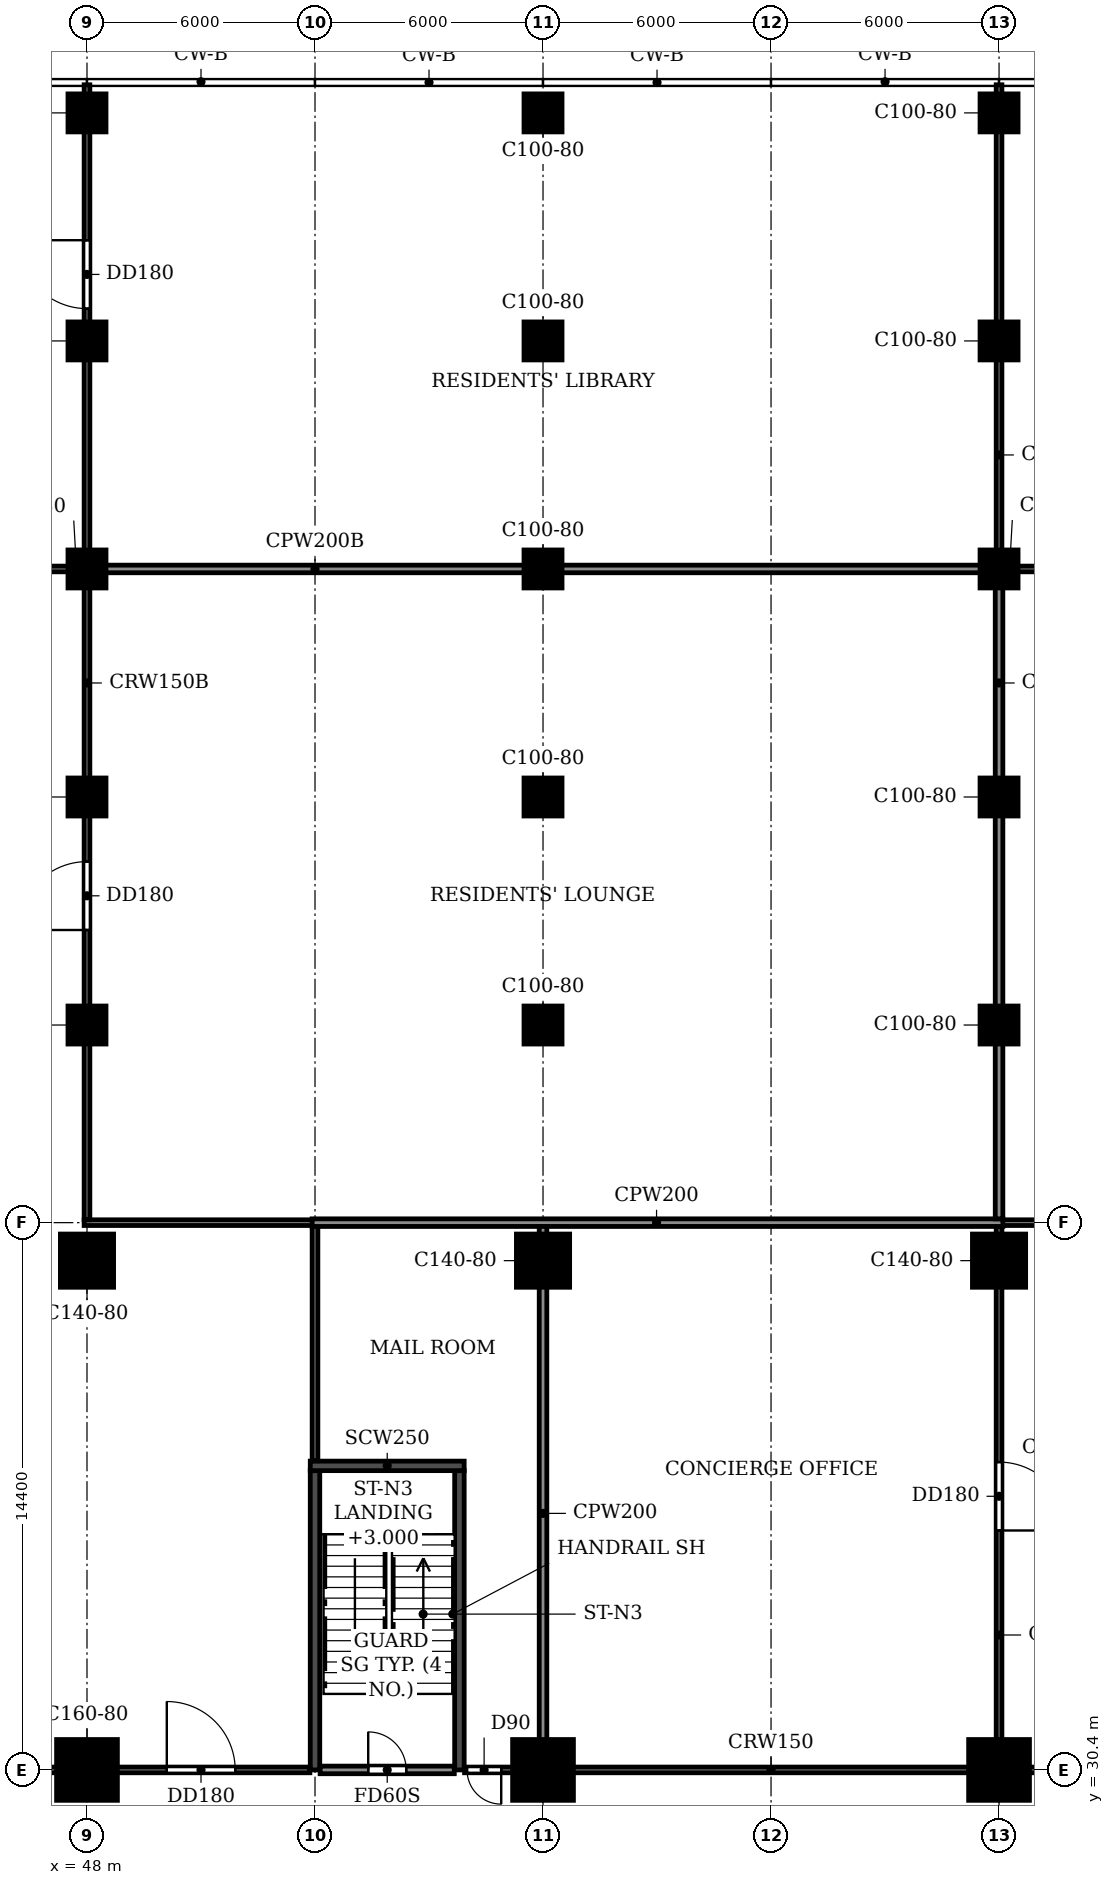
"""IFC4 building model, lengths in metres.
Left out: names, types, materials, properties, quantities, classifications, styles, units other than length and angle.
Written with IfcOpenShell. Run it as: python <this file> out.ifc"""

import sys

from ifc_helpers import new_model, si_unit, direction, frame, frame_2d, origin, origin_2d, place, context, subcontext, project, spatial, rectangle, extrude, source, transform, mapped, element, fill, save


model = new_model("IFC4")
c1 = context("Model", 3, precision=1e-05, world=origin(), true_north=direction((0.0, 1.0)))
c2 = subcontext(c1, "Body", "Model", "MODEL_VIEW")
j1 = project(units=[si_unit("LENGTHUNIT", "METRE"), si_unit("PLANEANGLEUNIT", "RADIAN")], contexts=[c1])
p1 = place(None, origin())
s1 = spatial("IfcSite", under=j1, at=p1, CompositionType="ELEMENT")
p2 = place(p1, origin())
s2 = spatial("IfcBuilding", under=s1, at=p2, CompositionType="ELEMENT")
p3 = place(p2, origin())
s3 = spatial("IfcBuildingStorey", under=s2, at=p3, CompositionType="ELEMENT", Elevation=0.0)
m1 = source(origin(), c2, "Body", "SweptSolid", [
    extrude(rectangle(XDim=1.6, YDim=1.6, at=origin_2d()), origin(), (0.0, 0.0, 1.0), 4.5),
])
p4 = place(p3, frame((48.0, 30.4, -0.3), z_axis=(0.0, 0.0, 1.0), x_axis=(1.0, 0.0, 0.0)))
e1 = element("IfcColumn", 1, at=p4, inside=s3, PredefinedType="COLUMN", context=c2, shape_type="MappedRepresentation", body=[
    mapped(m1, transform((0.0, 0.0, 0.0))),
])
m2 = source(origin(), c2, "Body", "SweptSolid", [
    extrude(rectangle(XDim=1.4, YDim=1.4, at=origin_2d()), origin(), (0.0, 0.0, 1.0), 4.5),
])
p5 = place(p3, frame((48.0, 43.8, -0.3), z_axis=(0.0, 0.0, 1.0), x_axis=(1.0, 0.0, 0.0)))
e2 = element("IfcColumn", 2, at=p5, inside=s3, PredefinedType="COLUMN", context=c2, shape_type="MappedRepresentation", body=[
    mapped(m2, transform((0.0, 0.0, 0.0))),
])
p6 = place(p3, frame((60.0, 30.4, -0.3), z_axis=(0.0, 0.0, 1.0), x_axis=(1.0, 0.0, 0.0)))
e3 = element("IfcColumn", 3, at=p6, inside=s3, PredefinedType="COLUMN", context=c2, shape_type="MappedRepresentation", body=[
    mapped(m1, transform((0.0, 0.0, 0.0))),
])
p7 = place(p3, frame((60.0, 43.8, -0.3), z_axis=(0.0, 0.0, 1.0), x_axis=(1.0, 0.0, 0.0)))
e4 = element("IfcColumn", 4, at=p7, inside=s3, PredefinedType="COLUMN", context=c2, shape_type="MappedRepresentation", body=[
    mapped(m2, transform((0.0, 0.0, 0.0))),
])
p8 = place(p3, frame((72.0, 30.4, -0.3), z_axis=(0.0, 0.0, 1.0), x_axis=(1.0, 0.0, 0.0)))
e5 = element("IfcColumn", 5, at=p8, inside=s3, PredefinedType="COLUMN", context=c2, shape_type="MappedRepresentation", body=[
    mapped(m1, transform((0.0, 0.0, 0.0))),
])
p9 = place(p3, frame((72.0, 43.8, -0.3), z_axis=(0.0, 0.0, 1.0), x_axis=(1.0, 0.0, 0.0)))
e6 = element("IfcColumn", 6, at=p9, inside=s3, PredefinedType="COLUMN", context=c2, shape_type="MappedRepresentation", body=[
    mapped(m2, transform((0.0, 0.0, 0.0))),
])
m3 = source(origin(), c2, "Body", "SweptSolid", [
    extrude(rectangle(XDim=1.0, YDim=1.0, at=origin_2d()), origin(), (0.0, 0.0, 1.0), 5.98),
])
for number, where, z_axis, x_axis in (
    (7, (48.0, 74.0, -0.3), (0.0, 0.0, 1.0), (1.0, 0.0, 0.0)),
    (8, (60.0, 74.0, -0.3), (0.0, 0.0, 1.0), (1.0, 0.0, 0.0)),
    (9, (72.0, 74.0, -0.3), (0.0, 0.0, 1.0), (1.0, 0.0, 0.0)),
    (10, (48.0, 68.0, -0.3), (0.0, 0.0, 1.0), (1.0, 0.0, 0.0)),
    (11, (60.0, 68.0, -0.3), (0.0, 0.0, 1.0), (1.0, 0.0, 0.0)),
    (12, (72.0, 68.0, -0.3), (0.0, 0.0, 1.0), (1.0, 0.0, 0.0)),
    (13, (48.0, 62.0, -0.3), (0.0, 0.0, 1.0), (1.0, 0.0, 0.0)),
    (14, (60.0, 62.0, -0.3), (0.0, 0.0, 1.0), (1.0, 0.0, 0.0)),
    (15, (72.0, 62.0, -0.3), (0.0, 0.0, 1.0), (1.0, 0.0, 0.0)),
    (16, (48.0, 56.0, -0.3), (0.0, 0.0, 1.0), (1.0, 0.0, 0.0)),
    (17, (60.0, 56.0, -0.3), (0.0, 0.0, 1.0), (1.0, 0.0, 0.0)),
    (18, (72.0, 56.0, -0.3), (0.0, 0.0, 1.0), (1.0, 0.0, 0.0)),
    (19, (48.0, 50.0, -0.3), (0.0, 0.0, 1.0), (1.0, 0.0, 0.0)),
    (20, (60.0, 50.0, -0.3), (0.0, 0.0, 1.0), (1.0, 0.0, 0.0)),
    (21, (72.0, 50.0, -0.3), (0.0, 0.0, 1.0), (1.0, 0.0, 0.0)),
):
    element("IfcColumn", number, at=place(p3, frame(where, z_axis=z_axis, x_axis=x_axis)), inside=s3, PredefinedType="COLUMN", context=c2, shape_type="MappedRepresentation", body=[
        mapped(m3, transform((0.0, 0.0, 0.0))),
    ])
p10 = place(p3, frame((57.8, 30.4, 0.0), z_axis=(0.0, 0.0, 1.0), x_axis=(0.0, 1.0, 0.0)))
e22 = element("IfcWall", 22, at=p10, inside=s3, PredefinedType="SOLIDWALL", context=c2, shape_type="SweptSolid", body=[
    extrude(rectangle(XDim=7.875, YDim=0.25, at=frame_2d((3.938, 0.0))), origin(), (0.0, 0.0, 1.0), 4.2),
])
p11 = place(p3, frame((53.875, 38.4, 0.0), z_axis=(0.0, 0.0, 1.0), x_axis=(1.0, 0.0, 0.0)))
e23 = element("IfcWall", 23, at=p11, inside=s3, PredefinedType="SOLIDWALL", context=c2, shape_type="SweptSolid", body=[
    extrude(rectangle(XDim=4.05, YDim=0.25, at=frame_2d((2.025, 0.0))), origin(), (0.0, 0.0, 1.0), 4.2),
])
p12 = place(p3, frame((54.0, 30.4, 0.0), z_axis=(0.0, 0.0, 1.0), x_axis=(0.0, 1.0, 0.0)))
e24 = element("IfcWall", 24, at=p12, inside=s3, PredefinedType="SOLIDWALL", context=c2, shape_type="SweptSolid", body=[
    extrude(rectangle(XDim=7.875, YDim=0.25, at=frame_2d((3.938, 0.0))), origin(), (0.0, 0.0, 1.0), 4.2),
])
p13 = place(p3, frame((37.9, 30.4, 0.0), z_axis=(0.0, 0.0, 1.0), x_axis=(1.0, 0.0, 0.0)))
e25 = element("IfcWall", 25, at=p13, inside=s3, PredefinedType="PARTITIONING", context=c2, shape_type="SweptSolid", body=[
    extrude(rectangle(XDim=15.965, YDim=0.15, at=frame_2d((7.982, 0.0))), origin(), (0.0, 0.0, 1.0), 4.2),
])
p14 = place(p13, frame((12.2, 0.0, 0.0)))
e26 = element("IfcOpeningElement", 26, at=p14, cuts=e25, PredefinedType="OPENING", context=c2, shape_type="SweptSolid", body=[
    extrude(rectangle(XDim=1.8, YDim=2.1, at=frame_2d((0.9, 1.05))), frame((0.0, 0.085, 0.0), z_axis=(0.0, -1.0, 0.0), x_axis=(1.0, 0.0, 0.0)), (0.0, 0.0, 1.0), 0.17),
])
p15 = place(p3, frame((57.935, 30.4, 0.0), z_axis=(0.0, 0.0, 1.0), x_axis=(1.0, 0.0, 0.0)))
e27 = element("IfcWall", 27, at=p15, inside=s3, PredefinedType="PARTITIONING", context=c2, shape_type="SweptSolid", body=[
    extrude(rectangle(XDim=19.93, YDim=0.15, at=frame_2d((9.965, 0.0))), origin(), (0.0, 0.0, 1.0), 4.2),
])
p16 = place(p15, frame((0.065, 0.0, 0.0)))
e28 = element("IfcOpeningElement", 28, at=p16, cuts=e27, PredefinedType="OPENING", context=c2, shape_type="SweptSolid", body=[
    extrude(rectangle(XDim=0.9, YDim=2.1, at=frame_2d((0.45, 1.05))), frame((0.0, 0.085, 0.0), z_axis=(0.0, -1.0, 0.0), x_axis=(1.0, 0.0, 0.0)), (0.0, 0.0, 1.0), 0.17),
])
p17 = place(p15, frame((15.965, 0.0, 0.0)))
e29 = element("IfcOpeningElement", 29, at=p17, cuts=e27, PredefinedType="OPENING", context=c2, shape_type="SweptSolid", body=[
    extrude(rectangle(XDim=1.8, YDim=2.1, at=frame_2d((0.9, 1.05))), frame((0.0, 0.085, 0.0), z_axis=(0.0, -1.0, 0.0), x_axis=(1.0, 0.0, 0.0)), (0.0, 0.0, 1.0), 0.17),
])
p18 = place(p3, frame((47.925, 44.8, 0.0), z_axis=(0.0, 0.0, 1.0), x_axis=(1.0, 0.0, 0.0)))
e30 = element("IfcWall", 30, at=p18, inside=s3, PredefinedType="PARTITIONING", context=c2, shape_type="SweptSolid", body=[
    extrude(rectangle(XDim=6.15, YDim=0.15, at=frame_2d((3.075, 0.0))), origin(), (0.0, 0.0, 1.0), 4.2),
])
p19 = place(p3, frame((71.9, 44.8, 0.0), z_axis=(0.0, 0.0, 1.0), x_axis=(1.0, 0.0, 0.0)))
e31 = element("IfcWall", 31, at=p19, inside=s3, PredefinedType="PARTITIONING", context=c2, shape_type="SweptSolid", body=[
    extrude(rectangle(XDim=6.175, YDim=0.15, at=frame_2d((3.087, 0.0))), origin(), (0.0, 0.0, 1.0), 4.2),
])
p20 = place(p19, frame((2.0, 0.0, 0.0)))
e32 = element("IfcOpeningElement", 32, at=p20, cuts=e31, PredefinedType="OPENING", context=c2, shape_type="SweptSolid", body=[
    extrude(rectangle(XDim=1.8, YDim=2.1, at=frame_2d((0.9, 1.05))), frame((0.0, 0.085, 0.0), z_axis=(0.0, -1.0, 0.0), x_axis=(1.0, 0.0, 0.0)), (0.0, 0.0, 1.0), 0.17),
])
p21 = place(p3, frame((-2.74, 62.0, 0.0), z_axis=(0.0, 0.0, 1.0), x_axis=(1.0, 0.0, 0.0)))
e33 = element("IfcWall", 33, at=p21, inside=s3, PredefinedType="PARTITIONING", context=c2, shape_type="SweptSolid", body=[
    extrude(rectangle(XDim=50.665, YDim=0.15, at=frame_2d((25.333, 0.0))), origin(), (0.0, 0.0, 1.0), 5.68),
])
p22 = place(p21, frame((9.44, 0.0, 0.0)))
e34 = element("IfcOpeningElement", 34, at=p22, cuts=e33, PredefinedType="OPENING", context=c2, shape_type="SweptSolid", body=[
    extrude(rectangle(XDim=1.8, YDim=2.1, at=frame_2d((0.9, 1.05))), frame((0.0, 0.085, 0.0), z_axis=(0.0, -1.0, 0.0), x_axis=(1.0, 0.0, 0.0)), (0.0, 0.0, 1.0), 0.17),
])
p23 = place(p21, frame((27.59, 0.0, 0.0)))
e35 = element("IfcOpeningElement", 35, at=p23, cuts=e33, PredefinedType="OPENING", context=c2, shape_type="SweptSolid", body=[
    extrude(rectangle(XDim=1.0, YDim=2.1, at=frame_2d((0.5, 1.05))), frame((0.0, 0.085, 0.0), z_axis=(0.0, -1.0, 0.0), x_axis=(1.0, 0.0, 0.0)), (0.0, 0.0, 1.0), 0.17),
])
p24 = place(p21, frame((40.84, 0.0, 0.0)))
e36 = element("IfcOpeningElement", 36, at=p24, cuts=e33, PredefinedType="OPENING", context=c2, shape_type="SweptSolid", body=[
    extrude(rectangle(XDim=1.8, YDim=2.1, at=frame_2d((0.9, 1.05))), frame((0.0, 0.085, 0.0), z_axis=(0.0, -1.0, 0.0), x_axis=(1.0, 0.0, 0.0)), (0.0, 0.0, 1.0), 0.17),
])
p25 = place(p3, frame((71.9, 62.0, 0.0), z_axis=(0.0, 0.0, 1.0), x_axis=(1.0, 0.0, 0.0)))
e37 = element("IfcWall", 37, at=p25, inside=s3, PredefinedType="PARTITIONING", context=c2, shape_type="SweptSolid", body=[
    extrude(rectangle(XDim=32.84, YDim=0.15, at=frame_2d((16.42, 0.0))), origin(), (0.0, 0.0, 1.0), 5.68),
])
p26 = place(p25, frame((9.45, 0.0, 0.0)))
e38 = element("IfcOpeningElement", 38, at=p26, cuts=e37, PredefinedType="OPENING", context=c2, shape_type="SweptSolid", body=[
    extrude(rectangle(XDim=1.8, YDim=2.1, at=frame_2d((0.9, 1.05))), frame((0.0, 0.085, 0.0), z_axis=(0.0, -1.0, 0.0), x_axis=(1.0, 0.0, 0.0)), (0.0, 0.0, 1.0), 0.17),
])
p27 = place(p25, frame((26.4, 0.0, 0.0)))
e39 = element("IfcOpeningElement", 39, at=p27, cuts=e37, PredefinedType="OPENING", context=c2, shape_type="SweptSolid", body=[
    extrude(rectangle(XDim=1.0, YDim=2.1, at=frame_2d((0.5, 1.05))), frame((0.0, 0.085, 0.0), z_axis=(0.0, -1.0, 0.0), x_axis=(1.0, 0.0, 0.0)), (0.0, 0.0, 1.0), 0.17),
])
p28 = place(p3, frame((48.0, 44.875, 0.0), z_axis=(0.0, 0.0, 1.0), x_axis=(0.0, 1.0, 0.0)))
e40 = element("IfcWall", 40, at=p28, inside=s3, PredefinedType="PARTITIONING", context=c2, shape_type="SweptSolid", body=[
    extrude(rectangle(XDim=29.865, YDim=0.15, at=frame_2d((14.933, 0.0))), origin(), (0.0, 0.0, 1.0), 5.68),
])
p29 = place(p28, frame((23.975, 0.0, 0.0)))
e41 = element("IfcOpeningElement", 41, at=p29, cuts=e40, PredefinedType="OPENING", context=c2, shape_type="SweptSolid", body=[
    extrude(rectangle(XDim=1.8, YDim=2.1, at=frame_2d((0.9, 1.05))), frame((0.0, 0.085, 0.0), z_axis=(0.0, -1.0, 0.0), x_axis=(1.0, 0.0, 0.0)), (0.0, 0.0, 1.0), 0.17),
])
p30 = place(p28, frame((7.625, 0.0, 0.0)))
e42 = element("IfcOpeningElement", 42, at=p30, cuts=e40, PredefinedType="OPENING", context=c2, shape_type="SweptSolid", body=[
    extrude(rectangle(XDim=1.8, YDim=2.1, at=frame_2d((0.9, 1.05))), frame((0.0, 0.085, 0.0), z_axis=(0.0, -1.0, 0.0), x_axis=(1.0, 0.0, 0.0)), (0.0, 0.0, 1.0), 0.17),
])
p31 = place(p3, frame((54.0, 38.535, 0.0), z_axis=(0.0, 0.0, 1.0), x_axis=(0.0, 1.0, 0.0)))
e43 = element("IfcWall", 43, at=p31, inside=s3, PredefinedType="PARTITIONING", context=c2, shape_type="SweptSolid", body=[
    extrude(rectangle(XDim=6.165, YDim=0.15, at=frame_2d((3.083, 0.0))), origin(), (0.0, 0.0, 1.0), 4.2),
])
p32 = place(p3, frame((72.0, 30.475, 0.0), z_axis=(0.0, 0.0, 1.0), x_axis=(0.0, 1.0, 0.0)))
e44 = element("IfcWall", 44, at=p32, inside=s3, PredefinedType="PARTITIONING", context=c2, shape_type="SweptSolid", body=[
    extrude(rectangle(XDim=14.225, YDim=0.15, at=frame_2d((7.112, 0.0))), origin(), (0.0, 0.0, 1.0), 4.2),
])
p33 = place(p32, frame((6.225, 0.0, 0.0)))
e45 = element("IfcOpeningElement", 45, at=p33, cuts=e44, PredefinedType="OPENING", context=c2, shape_type="SweptSolid", body=[
    extrude(rectangle(XDim=1.8, YDim=2.1, at=frame_2d((0.9, 1.05))), frame((0.0, 0.085, 0.0), z_axis=(0.0, -1.0, 0.0), x_axis=(1.0, 0.0, 0.0)), (0.0, 0.0, 1.0), 0.17),
])
p34 = place(p3, frame((72.0, 62.1, 0.0), z_axis=(0.0, 0.0, 1.0), x_axis=(0.0, 1.0, 0.0)))
e46 = element("IfcWall", 46, at=p34, inside=s3, PredefinedType="PARTITIONING", context=c2, shape_type="SweptSolid", body=[
    extrude(rectangle(XDim=12.64, YDim=0.15, at=frame_2d((6.32, 0.0))), origin(), (0.0, 0.0, 1.0), 5.68),
])
p35 = place(p3, frame((53.925, 44.8, 0.0), z_axis=(0.0, 0.0, 1.0), x_axis=(1.0, 0.0, 0.0)))
e47 = element("IfcWall", 47, at=p35, inside=s3, PredefinedType="PARTITIONING", context=c2, shape_type="SweptSolid", body=[
    extrude(rectangle(XDim=18.175, YDim=0.2, at=frame_2d((9.087, 0.0))), origin(), (0.0, 0.0, 1.0), 4.2),
])
p36 = place(p3, frame((48.075, 62.0, 0.0), z_axis=(0.0, 0.0, 1.0), x_axis=(1.0, 0.0, 0.0)))
e48 = element("IfcWall", 48, at=p36, inside=s3, PredefinedType="PARTITIONING", context=c2, shape_type="SweptSolid", body=[
    extrude(rectangle(XDim=24.025, YDim=0.2, at=frame_2d((12.013, 0.0))), origin(), (0.0, 0.0, 1.0), 5.68),
])
p37 = place(p3, frame((60.0, 30.475, 0.0), z_axis=(0.0, 0.0, 1.0), x_axis=(0.0, 1.0, 0.0)))
e49 = element("IfcWall", 49, at=p37, inside=s3, PredefinedType="PARTITIONING", context=c2, shape_type="SweptSolid", body=[
    extrude(rectangle(XDim=14.225, YDim=0.2, at=frame_2d((7.112, 0.0))), origin(), (0.0, 0.0, 1.0), 4.2),
])
p38 = place(p3, frame((72.0, 44.9, 0.0), z_axis=(0.0, 0.0, 1.0), x_axis=(0.0, 1.0, 0.0)))
e50 = element("IfcWall", 50, at=p38, inside=s3, PredefinedType="PARTITIONING", context=c2, shape_type="SweptSolid", body=[
    extrude(rectangle(XDim=17.0, YDim=0.2, at=frame_2d((8.5, 0.0))), origin(), (0.0, 0.0, 1.0), 5.68),
])
p39 = place(p3, frame((54.135, 30.4, 0.0), z_axis=(0.0, 0.0, 1.0), x_axis=(1.0, 0.0, 0.0)))
e51 = element("IfcWall", 51, at=p39, inside=s3, PredefinedType="PARTITIONING", context=c2, shape_type="SweptSolid", body=[
    extrude(rectangle(XDim=3.53, YDim=0.2, at=frame_2d((1.765, 0.0))), origin(), (0.0, 0.0, 1.0), 4.2),
])
p40 = place(p39, frame((1.265, 0.0, 0.0)))
e52 = element("IfcOpeningElement", 52, at=p40, cuts=e51, PredefinedType="OPENING", context=c2, shape_type="SweptSolid", body=[
    extrude(rectangle(XDim=1.0, YDim=2.1, at=frame_2d((0.5, 1.05))), frame((0.0, 0.11, 0.0), z_axis=(0.0, -1.0, 0.0), x_axis=(1.0, 0.0, 0.0)), (0.0, 0.0, 1.0), 0.22),
])
p41 = place(p40, origin())
e53 = element("IfcDoor", 53, at=p41, inside=s3, OperationType="SINGLE_SWING_LEFT", PredefinedType="DOOR", context=c2, shape_type="SweptSolid", body=[
    extrude(rectangle(XDim=1.0, YDim=2.1, at=frame_2d((0.5, 1.05))), frame((0.0, 0.025, 0.0), z_axis=(0.0, -1.0, 0.0), x_axis=(1.0, 0.0, 0.0)), (0.0, 0.0, 1.0), 0.05),
])
fill(e52, e53)
p42 = place(p16, frame((0.9, 0.0, 0.0), z_axis=(0.0, 0.0, 1.0), x_axis=(-1.0, 0.0, 0.0)))
e54 = element("IfcDoor", 54, at=p42, inside=s3, OperationType="SINGLE_SWING_LEFT", PredefinedType="DOOR", context=c2, shape_type="SweptSolid", body=[
    extrude(rectangle(XDim=0.9, YDim=2.1, at=frame_2d((0.45, 1.05))), frame((0.0, 0.025, 0.0), z_axis=(0.0, -1.0, 0.0), x_axis=(1.0, 0.0, 0.0)), (0.0, 0.0, 1.0), 0.05),
])
fill(e28, e54)
p43 = place(p33, frame((1.8, 0.0, 0.0), z_axis=(0.0, 0.0, 1.0), x_axis=(-1.0, 0.0, 0.0)))
e55 = element("IfcDoor", 55, at=p43, inside=s3, OperationType="DOUBLE_DOOR_SINGLE_SWING", PredefinedType="DOOR", context=c2, shape_type="SweptSolid", body=[
    extrude(rectangle(XDim=1.8, YDim=2.1, at=frame_2d((0.9, 1.05))), frame((0.0, 0.025, 0.0), z_axis=(0.0, -1.0, 0.0), x_axis=(1.0, 0.0, 0.0)), (0.0, 0.0, 1.0), 0.05),
])
fill(e45, e55)
p44 = place(p29, origin())
e56 = element("IfcDoor", 56, at=p44, inside=s3, OperationType="DOUBLE_DOOR_SINGLE_SWING", PredefinedType="DOOR", context=c2, shape_type="SweptSolid", body=[
    extrude(rectangle(XDim=1.8, YDim=2.1, at=frame_2d((0.9, 1.05))), frame((0.0, 0.025, 0.0), z_axis=(0.0, -1.0, 0.0), x_axis=(1.0, 0.0, 0.0)), (0.0, 0.0, 1.0), 0.05),
])
fill(e41, e56)
p45 = place(p30, origin())
e57 = element("IfcDoor", 57, at=p45, inside=s3, OperationType="DOUBLE_DOOR_SINGLE_SWING", PredefinedType="DOOR", context=c2, shape_type="SweptSolid", body=[
    extrude(rectangle(XDim=1.8, YDim=2.1, at=frame_2d((0.9, 1.05))), frame((0.0, 0.025, 0.0), z_axis=(0.0, -1.0, 0.0), x_axis=(1.0, 0.0, 0.0)), (0.0, 0.0, 1.0), 0.05),
])
fill(e42, e57)
p46 = place(p14, origin())
e58 = element("IfcDoor", 58, at=p46, inside=s3, OperationType="DOUBLE_DOOR_SINGLE_SWING", PredefinedType="DOOR", context=c2, shape_type="SweptSolid", body=[
    extrude(rectangle(XDim=1.8, YDim=2.1, at=frame_2d((0.9, 1.05))), frame((0.0, 0.025, 0.0), z_axis=(0.0, -1.0, 0.0), x_axis=(1.0, 0.0, 0.0)), (0.0, 0.0, 1.0), 0.05),
])
fill(e26, e58)
save(model, sys.argv[1])
